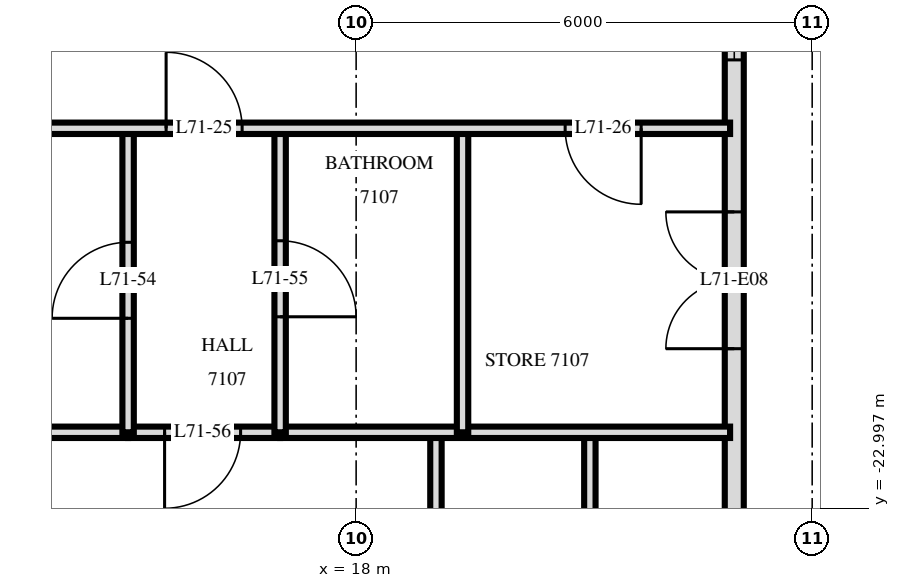
"""IFC4 building model, lengths in metres.
Left out: names, types, materials, properties, quantities, classifications, styles, units other than length and angle.
Written with IfcOpenShell. Run it as: python <this file> out.ifc"""

import sys

from ifc_helpers import new_model, si_unit, direction, frame, frame_2d, origin, place, context, subcontext, project, spatial, rectangle, extrude, element, fill, save


model = new_model("IFC4")
c1 = context("Model", 3, precision=1e-05, world=origin(), true_north=direction((0.0, 1.0)))
c2 = subcontext(c1, "Body", "Model", "MODEL_VIEW")
j1 = project(units=[si_unit("LENGTHUNIT", "METRE"), si_unit("PLANEANGLEUNIT", "RADIAN")], contexts=[c1])
p1 = place(None, origin())
s1 = spatial("IfcSite", under=j1, at=p1, CompositionType="ELEMENT")
p2 = place(p1, origin())
s2 = spatial("IfcBuilding", under=s1, at=p2, CompositionType="ELEMENT")
p3 = place(p2, frame((0.0, 0.0, 270.1)))
s3 = spatial("IfcBuildingStorey", under=s2, at=p3, CompositionType="ELEMENT", Elevation=270.1)
p4 = place(p3, frame((22.975, -29.275, 0.0), z_axis=(0.0, 0.0, 1.0), x_axis=(0.0, 1.0, 0.0)))
e1 = element("IfcWall", 1, at=p4, inside=s3, PredefinedType="SOLIDWALL", context=c2, shape_type="SweptSolid", body=[
    extrude(rectangle(XDim=25.951, YDim=0.25, at=frame_2d((12.975, 0.0))), origin(), (0.0, 0.0, 1.0), 3.22),
])
p5 = place(p4, frame((0.575, 0.0, 0.0)))
e2 = element("IfcOpeningElement", 2, at=p5, cuts=e1, PredefinedType="OPENING", context=c2, shape_type="SweptSolid", body=[
    extrude(rectangle(XDim=1.8, YDim=2.4, at=frame_2d((0.9, 1.2))), frame((0.0, 0.135, 0.0), z_axis=(0.0, -1.0, 0.0), x_axis=(1.0, 0.0, 0.0)), (0.0, 0.0, 1.0), 0.27),
])
p6 = place(p4, frame((3.325, 0.0, 0.9)))
e3 = element("IfcOpeningElement", 3, at=p6, cuts=e1, PredefinedType="OPENING", context=c2, shape_type="SweptSolid", body=[
    extrude(rectangle(XDim=1.8, YDim=1.5, at=frame_2d((0.9, 0.75))), frame((0.0, 0.135, 0.0), z_axis=(0.0, -1.0, 0.0), x_axis=(1.0, 0.0, 0.0)), (0.0, 0.0, 1.0), 0.27),
])
p7 = place(p4, frame((8.375, 0.0, 0.0)))
e4 = element("IfcOpeningElement", 4, at=p7, cuts=e1, PredefinedType="OPENING", context=c2, shape_type="SweptSolid", body=[
    extrude(rectangle(XDim=1.8, YDim=2.4, at=frame_2d((0.9, 1.2))), frame((0.0, 0.135, 0.0), z_axis=(0.0, -1.0, 0.0), x_axis=(1.0, 0.0, 0.0)), (0.0, 0.0, 1.0), 0.27),
])
p8 = place(p4, frame((12.175, 0.0, 0.9)))
e5 = element("IfcOpeningElement", 5, at=p8, cuts=e1, PredefinedType="OPENING", context=c2, shape_type="SweptSolid", body=[
    extrude(rectangle(XDim=1.2, YDim=1.5, at=frame_2d((0.6, 0.75))), frame((0.0, 0.135, 0.0), z_axis=(0.0, -1.0, 0.0), x_axis=(1.0, 0.0, 0.0)), (0.0, 0.0, 1.0), 0.27),
])
p9 = place(p4, frame((16.175, 0.0, 0.0)))
e6 = element("IfcOpeningElement", 6, at=p9, cuts=e1, PredefinedType="OPENING", context=c2, shape_type="SweptSolid", body=[
    extrude(rectangle(XDim=1.8, YDim=2.4, at=frame_2d((0.9, 1.2))), frame((0.0, 0.135, 0.0), z_axis=(0.0, -1.0, 0.0), x_axis=(1.0, 0.0, 0.0)), (0.0, 0.0, 1.0), 0.27),
])
p10 = place(p4, frame((22.225, 0.0, 0.0)))
e7 = element("IfcOpeningElement", 7, at=p10, cuts=e1, PredefinedType="OPENING", context=c2, shape_type="SweptSolid", body=[
    extrude(rectangle(XDim=1.8, YDim=2.4, at=frame_2d((0.9, 1.2))), frame((0.0, 0.135, 0.0), z_axis=(0.0, -1.0, 0.0), x_axis=(1.0, 0.0, 0.0)), (0.0, 0.0, 1.0), 0.27),
])
p11 = place(p3, frame((21.075, -32.666, 0.0), z_axis=(0.0, 0.0, 1.0), x_axis=(0.0, 1.0, 0.0)))
e8 = element("IfcWall", 8, at=p11, inside=s3, PredefinedType="PARTITIONING", context=c2, shape_type="SweptSolid", body=[
    extrude(rectangle(XDim=10.666, YDim=0.15, at=frame_2d((5.333, 0.0))), origin(), (0.0, 0.0, 1.0), 3.22),
])
p12 = place(p11, frame((4.746, 0.0, 0.0)))
e9 = element("IfcOpeningElement", 9, at=p12, cuts=e8, PredefinedType="OPENING", context=c2, shape_type="SweptSolid", body=[
    extrude(rectangle(XDim=0.9, YDim=2.1, at=frame_2d((0.45, 1.05))), frame((0.0, 0.085, 0.0), z_axis=(0.0, -1.0, 0.0), x_axis=(1.0, 0.0, 0.0)), (0.0, 0.0, 1.0), 0.17),
])
p13 = place(p3, frame((19.4, -22.0, 0.0), z_axis=(0.0, 0.0, 1.0), x_axis=(0.0, 1.0, 0.0)))
e10 = element("IfcWall", 10, at=p13, inside=s3, PredefinedType="PARTITIONING", context=c2, shape_type="SweptSolid", body=[
    extrude(rectangle(XDim=4.0, YDim=0.15, at=frame_2d((2.0, 0.0))), origin(), (0.0, 0.0, 1.0), 3.22),
])
p14 = place(p3, frame((19.05, -33.527, 0.0), z_axis=(0.0, 0.0, 1.0), x_axis=(0.0, 1.0, 0.0)))
e11 = element("IfcWall", 11, at=p14, inside=s3, PredefinedType="PARTITIONING", context=c2, shape_type="SweptSolid", body=[
    extrude(rectangle(XDim=11.527, YDim=0.15, at=frame_2d((5.764, 0.0))), origin(), (0.0, 0.0, 1.0), 3.22),
])
p15 = place(p14, frame((5.207, 0.0, 0.0)))
e12 = element("IfcOpeningElement", 12, at=p15, cuts=e11, PredefinedType="OPENING", context=c2, shape_type="SweptSolid", body=[
    extrude(rectangle(XDim=0.9, YDim=2.1, at=frame_2d((0.45, 1.05))), frame((0.0, 0.085, 0.0), z_axis=(0.0, -1.0, 0.0), x_axis=(1.0, 0.0, 0.0)), (0.0, 0.0, 1.0), 0.17),
])
p16 = place(p3, frame((17.0, -22.0, 0.0), z_axis=(0.0, 0.0, 1.0), x_axis=(0.0, 1.0, 0.0)))
e13 = element("IfcWall", 13, at=p16, inside=s3, PredefinedType="PARTITIONING", context=c2, shape_type="SweptSolid", body=[
    extrude(rectangle(XDim=4.0, YDim=0.15, at=frame_2d((2.0, 0.0))), origin(), (0.0, 0.0, 1.0), 3.22),
])
p17 = place(p16, frame((1.52, 0.0, 0.0)))
e14 = element("IfcOpeningElement", 14, at=p17, cuts=e13, PredefinedType="OPENING", context=c2, shape_type="SweptSolid", body=[
    extrude(rectangle(XDim=1.0, YDim=2.1, at=frame_2d((0.5, 1.05))), frame((0.0, 0.085, 0.0), z_axis=(0.0, -1.0, 0.0), x_axis=(1.0, 0.0, 0.0)), (0.0, 0.0, 1.0), 0.17),
])
p18 = place(p3, frame((15.0, -22.0, 0.0), z_axis=(0.0, 0.0, 1.0), x_axis=(0.0, 1.0, 0.0)))
e15 = element("IfcWall", 15, at=p18, inside=s3, PredefinedType="PARTITIONING", context=c2, shape_type="SweptSolid", body=[
    extrude(rectangle(XDim=4.0, YDim=0.15, at=frame_2d((2.0, 0.0))), origin(), (0.0, 0.0, 1.0), 3.22),
])
p19 = place(p18, frame((1.5, 0.0, 0.0)))
e16 = element("IfcOpeningElement", 16, at=p19, cuts=e15, PredefinedType="OPENING", context=c2, shape_type="SweptSolid", body=[
    extrude(rectangle(XDim=1.0, YDim=2.1, at=frame_2d((0.5, 1.05))), frame((0.0, 0.085, 0.0), z_axis=(0.0, -1.0, 0.0), x_axis=(1.0, 0.0, 0.0)), (0.0, 0.0, 1.0), 0.17),
])
p20 = place(p3, frame((15.0, -22.0, 0.0), z_axis=(0.0, 0.0, 1.0), x_axis=(1.0, 0.0, 0.0)))
e17 = element("IfcWall", 17, at=p20, inside=s3, PredefinedType="PARTITIONING", context=c2, shape_type="SweptSolid", body=[
    extrude(rectangle(XDim=2.0, YDim=0.15, at=frame_2d((1.0, 0.0))), origin(), (0.0, 0.0, 1.0), 3.22),
])
p21 = place(p20, frame((0.48, 0.0, 0.0)))
e18 = element("IfcOpeningElement", 18, at=p21, cuts=e17, PredefinedType="OPENING", context=c2, shape_type="SweptSolid", body=[
    extrude(rectangle(XDim=1.0, YDim=2.1, at=frame_2d((0.5, 1.05))), frame((0.0, 0.085, 0.0), z_axis=(0.0, -1.0, 0.0), x_axis=(1.0, 0.0, 0.0)), (0.0, 0.0, 1.0), 0.17),
])
p22 = place(p3, frame((9.0, -22.0, 0.0), z_axis=(0.0, 0.0, 1.0), x_axis=(1.0, 0.0, 0.0)))
e19 = element("IfcWall", 19, at=p22, inside=s3, PredefinedType="PARTITIONING", context=c2, shape_type="SweptSolid", body=[
    extrude(rectangle(XDim=6.0, YDim=0.15, at=frame_2d((3.0, 0.0))), origin(), (0.0, 0.0, 1.0), 3.22),
])
p23 = place(p22, frame((0.605, 0.0, 0.0)))
e20 = element("IfcOpeningElement", 20, at=p23, cuts=e19, PredefinedType="OPENING", context=c2, shape_type="SweptSolid", body=[
    extrude(rectangle(XDim=0.8, YDim=2.1, at=frame_2d((0.4, 1.05))), frame((0.0, 0.085, 0.0), z_axis=(0.0, -1.0, 0.0), x_axis=(1.0, 0.0, 0.0)), (0.0, 0.0, 1.0), 0.17),
])
p24 = place(p3, frame((17.0, -22.0, 0.0), z_axis=(0.0, 0.0, 1.0), x_axis=(1.0, 0.0, 0.0)))
e21 = element("IfcWall", 21, at=p24, inside=s3, PredefinedType="PARTITIONING", context=c2, shape_type="SweptSolid", body=[
    extrude(rectangle(XDim=5.92, YDim=0.15, at=frame_2d((2.96, 0.0))), origin(), (0.0, 0.0, 1.0), 3.22),
])
p25 = place(p3, frame((-22.92, -18.0, 0.0), z_axis=(0.0, 0.0, 1.0), x_axis=(1.0, 0.0, 0.0)))
e22 = element("IfcWall", 22, at=p25, inside=s3, PredefinedType="PARTITIONING", context=c2, shape_type="SweptSolid", body=[
    extrude(rectangle(XDim=45.84, YDim=0.15, at=frame_2d((22.92, 0.0))), origin(), (0.0, 0.0, 1.0), 3.22),
])
p26 = place(p25, frame((14.07, 0.0, 0.0)))
e23 = element("IfcOpeningElement", 23, at=p26, cuts=e22, PredefinedType="OPENING", context=c2, shape_type="SweptSolid", body=[
    extrude(rectangle(XDim=1.0, YDim=2.1, at=frame_2d((0.5, 1.05))), frame((0.0, 0.085, 0.0), z_axis=(0.0, -1.0, 0.0), x_axis=(1.0, 0.0, 0.0)), (0.0, 0.0, 1.0), 0.17),
])
p27 = place(p25, frame((18.77, 0.0, 0.0)))
e24 = element("IfcOpeningElement", 24, at=p27, cuts=e22, PredefinedType="OPENING", context=c2, shape_type="SweptSolid", body=[
    extrude(rectangle(XDim=1.0, YDim=2.1, at=frame_2d((0.5, 1.05))), frame((0.0, 0.085, 0.0), z_axis=(0.0, -1.0, 0.0), x_axis=(1.0, 0.0, 0.0)), (0.0, 0.0, 1.0), 0.17),
])
p28 = place(p25, frame((20.07, 0.0, 0.0)))
e25 = element("IfcOpeningElement", 25, at=p28, cuts=e22, PredefinedType="OPENING", context=c2, shape_type="SweptSolid", body=[
    extrude(rectangle(XDim=1.0, YDim=2.1, at=frame_2d((0.5, 1.05))), frame((0.0, 0.085, 0.0), z_axis=(0.0, -1.0, 0.0), x_axis=(1.0, 0.0, 0.0)), (0.0, 0.0, 1.0), 0.17),
])
p29 = place(p25, frame((25.57, 0.0, 0.0)))
e26 = element("IfcOpeningElement", 26, at=p29, cuts=e22, PredefinedType="OPENING", context=c2, shape_type="SweptSolid", body=[
    extrude(rectangle(XDim=1.0, YDim=2.1, at=frame_2d((0.5, 1.05))), frame((0.0, 0.085, 0.0), z_axis=(0.0, -1.0, 0.0), x_axis=(1.0, 0.0, 0.0)), (0.0, 0.0, 1.0), 0.17),
])
p30 = place(p25, frame((29.07, 0.0, 0.0)))
e27 = element("IfcOpeningElement", 27, at=p30, cuts=e22, PredefinedType="OPENING", context=c2, shape_type="SweptSolid", body=[
    extrude(rectangle(XDim=1.0, YDim=2.1, at=frame_2d((0.5, 1.05))), frame((0.0, 0.085, 0.0), z_axis=(0.0, -1.0, 0.0), x_axis=(1.0, 0.0, 0.0)), (0.0, 0.0, 1.0), 0.17),
])
p31 = place(p25, frame((6.42, 0.0, 0.0)))
e28 = element("IfcOpeningElement", 28, at=p31, cuts=e22, PredefinedType="OPENING", context=c2, shape_type="SweptSolid", body=[
    extrude(rectangle(XDim=1.0, YDim=2.1, at=frame_2d((0.5, 1.05))), frame((0.0, 0.085, 0.0), z_axis=(0.0, -1.0, 0.0), x_axis=(1.0, 0.0, 0.0)), (0.0, 0.0, 1.0), 0.17),
])
p32 = place(p25, frame((1.17, 0.0, 0.0)))
e29 = element("IfcOpeningElement", 29, at=p32, cuts=e22, PredefinedType="OPENING", context=c2, shape_type="SweptSolid", body=[
    extrude(rectangle(XDim=1.0, YDim=2.1, at=frame_2d((0.5, 1.05))), frame((0.0, 0.085, 0.0), z_axis=(0.0, -1.0, 0.0), x_axis=(1.0, 0.0, 0.0)), (0.0, 0.0, 1.0), 0.17),
])
p33 = place(p25, frame((38.42, 0.0, 0.0)))
e30 = element("IfcOpeningElement", 30, at=p33, cuts=e22, PredefinedType="OPENING", context=c2, shape_type="SweptSolid", body=[
    extrude(rectangle(XDim=1.0, YDim=2.1, at=frame_2d((0.5, 1.05))), frame((0.0, 0.085, 0.0), z_axis=(0.0, -1.0, 0.0), x_axis=(1.0, 0.0, 0.0)), (0.0, 0.0, 1.0), 0.17),
])
p34 = place(p25, frame((43.67, 0.0, 0.0)))
e31 = element("IfcOpeningElement", 31, at=p34, cuts=e22, PredefinedType="OPENING", context=c2, shape_type="SweptSolid", body=[
    extrude(rectangle(XDim=1.0, YDim=2.1, at=frame_2d((0.5, 1.05))), frame((0.0, 0.085, 0.0), z_axis=(0.0, -1.0, 0.0), x_axis=(1.0, 0.0, 0.0)), (0.0, 0.0, 1.0), 0.17),
])
p35 = place(p7, origin())
e32 = element("IfcDoor", 32, at=p35, inside=s3, OperationType="DOUBLE_DOOR_SINGLE_SWING", PredefinedType="DOOR", context=c2, shape_type="SweptSolid", body=[
    extrude(rectangle(XDim=1.8, YDim=2.4, at=frame_2d((0.9, 1.2))), frame((0.0, 0.025, 0.0), z_axis=(0.0, -1.0, 0.0), x_axis=(1.0, 0.0, 0.0)), (0.0, 0.0, 1.0), 0.05),
])
fill(e4, e32)
p36 = place(p8, origin())
e33 = element("IfcWindow", 33, at=p36, inside=s3, PartitioningType="SINGLE_PANEL", PredefinedType="WINDOW", context=c2, shape_type="SweptSolid", body=[
    extrude(rectangle(XDim=1.2, YDim=1.5, at=frame_2d((0.6, 0.75))), frame((0.0, 0.03, 0.0), z_axis=(0.0, -1.0, 0.0), x_axis=(1.0, 0.0, 0.0)), (0.0, 0.0, 1.0), 0.06),
])
fill(e5, e33)
p37 = place(p33, origin())
e34 = element("IfcDoor", 34, at=p37, inside=s3, OperationType="SINGLE_SWING_RIGHT", PredefinedType="DOOR", context=c2, shape_type="SweptSolid", body=[
    extrude(rectangle(XDim=1.0, YDim=2.1, at=frame_2d((0.5, 1.05))), frame((0.0, 0.025, 0.0), z_axis=(0.0, -1.0, 0.0), x_axis=(1.0, 0.0, 0.0)), (0.0, 0.0, 1.0), 0.05),
])
fill(e30, e34)
p38 = place(p34, frame((0.5, 0.0, 0.0), z_axis=(0.0, 0.0, 1.0), x_axis=(-1.0, 0.0, 0.0)))
e35 = element("IfcDoor", 35, at=p38, inside=s3, OperationType="SINGLE_SWING_RIGHT", PredefinedType="DOOR", context=c2, shape_type="SweptSolid", body=[
    extrude(rectangle(XDim=1.0, YDim=2.1, at=frame_2d((0.0, 1.05))), frame((0.0, -0.025, 0.0), z_axis=(0.0, 1.0, 0.0), x_axis=(-1.0, 0.0, 0.0)), (0.0, 0.0, 1.0), 0.05),
])
fill(e31, e35)
p39 = place(p19, origin())
e36 = element("IfcDoor", 36, at=p39, inside=s3, OperationType="SINGLE_SWING_RIGHT", PredefinedType="DOOR", context=c2, shape_type="SweptSolid", body=[
    extrude(rectangle(XDim=1.0, YDim=2.1, at=frame_2d((0.5, 1.05))), frame((0.0, 0.025, 0.0), z_axis=(0.0, -1.0, 0.0), x_axis=(1.0, 0.0, 0.0)), (0.0, 0.0, 1.0), 0.05),
])
fill(e16, e36)
p40 = place(p17, frame((0.5, 0.0, 0.0), z_axis=(0.0, 0.0, 1.0), x_axis=(-1.0, 0.0, 0.0)))
e37 = element("IfcDoor", 37, at=p40, inside=s3, OperationType="SINGLE_SWING_LEFT", PredefinedType="DOOR", context=c2, shape_type="SweptSolid", body=[
    extrude(rectangle(XDim=1.0, YDim=2.1, at=frame_2d((0.0, 1.05))), frame((0.0, -0.025, 0.0), z_axis=(0.0, 1.0, 0.0), x_axis=(-1.0, 0.0, 0.0)), (0.0, 0.0, 1.0), 0.05),
])
fill(e14, e37)
p41 = place(p21, frame((0.5, 0.0, 0.0), z_axis=(0.0, 0.0, 1.0), x_axis=(-1.0, 0.0, 0.0)))
e38 = element("IfcDoor", 38, at=p41, inside=s3, OperationType="SINGLE_SWING_LEFT", PredefinedType="DOOR", context=c2, shape_type="SweptSolid", body=[
    extrude(rectangle(XDim=1.0, YDim=2.1, at=frame_2d((0.0, 1.05))), frame((0.0, -0.025, 0.0), z_axis=(0.0, 1.0, 0.0), x_axis=(-1.0, 0.0, 0.0)), (0.0, 0.0, 1.0), 0.05),
])
fill(e18, e38)
save(model, sys.argv[1])
